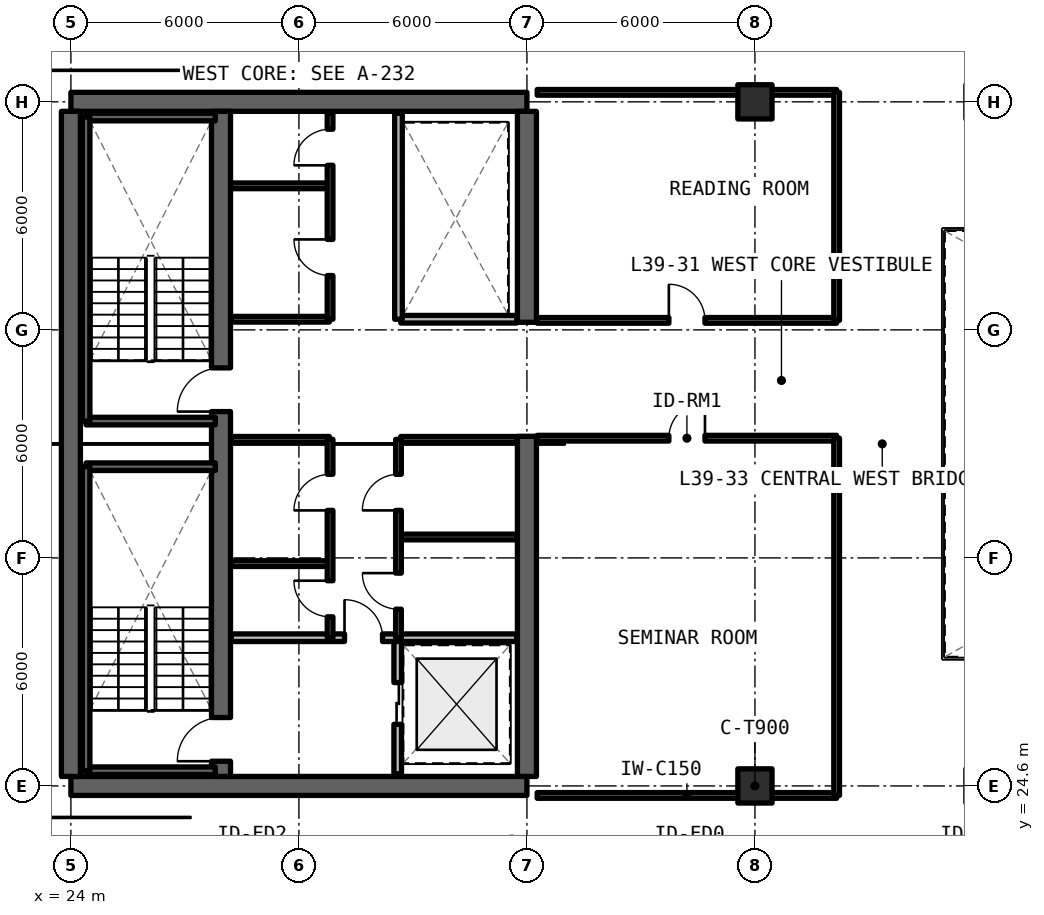
"""IFC4 building model, lengths in metres.
Left out: names, types, materials, properties, quantities, classifications, styles, units other than length and angle.
Written with IfcOpenShell. Run it as: python <this file> out.ifc"""

import sys

from ifc_helpers import new_model, si_unit, direction, frame, frame_2d, origin, origin_2d, place, context, subcontext, project, spatial, rectangle, extrude, element, fill, save


model = new_model("IFC4")
c1 = context("Model", 3, precision=1e-05, world=origin(), true_north=direction((0.0, 1.0)))
c2 = subcontext(c1, "Body", "Model", "MODEL_VIEW")
j1 = project(units=[si_unit("LENGTHUNIT", "METRE"), si_unit("PLANEANGLEUNIT", "RADIAN")], contexts=[c1])
p1 = place(None, origin())
s1 = spatial("IfcSite", under=j1, at=p1, CompositionType="ELEMENT")
p2 = place(p1, origin())
s2 = spatial("IfcBuilding", under=s1, at=p2, CompositionType="ELEMENT")
p3 = place(p2, frame((0.0, 0.0, 141.9)))
s3 = spatial("IfcBuildingStorey", under=s2, at=p3, CompositionType="ELEMENT", Elevation=141.9)
for number, where, z_axis, x_axis in (
    (1, (24.0, 24.6, 0.0), (0.0, 0.0, 1.0), (1.0, 0.0, 0.0)),
    (2, (36.0, 42.6, 0.0), (0.0, 0.0, 1.0), (-1.0, 0.0, 0.0)),
):
    element("IfcWall", number, at=place(p3, frame(where, z_axis=z_axis, x_axis=x_axis)), inside=s3, PredefinedType="SHEAR", context=c2, shape_type="SweptSolid", body=[
        extrude(rectangle(XDim=12.0, YDim=0.5, at=frame_2d((6.0, 0.0))), origin(), (0.0, 0.0, 1.0), 3.3),
    ])
p4 = place(p3, frame((24.0, 24.85, 0.0), z_axis=(0.0, 0.0, 1.0), x_axis=(0.0, 1.0, 0.0)))
e3 = element("IfcWall", 3, at=p4, inside=s3, PredefinedType="SHEAR", context=c2, shape_type="SweptSolid", body=[
    extrude(rectangle(XDim=17.5, YDim=0.5, at=frame_2d((8.75, 0.0))), origin(), (0.0, 0.0, 1.0), 3.3),
])
p5 = place(p3, frame((36.0, 24.85, 0.0), z_axis=(0.0, 0.0, 1.0), x_axis=(0.0, 1.0, 0.0)))
e4 = element("IfcWall", 4, at=p5, inside=s3, PredefinedType="SHEAR", context=c2, shape_type="SweptSolid", body=[
    extrude(rectangle(XDim=8.95, YDim=0.5, at=frame_2d((4.475, 0.0))), origin(), (0.0, 0.0, 1.0), 3.3),
])
p6 = place(p3, frame((36.0, 36.8, 0.0), z_axis=(0.0, 0.0, 1.0), x_axis=(0.0, 1.0, 0.0)))
e5 = element("IfcWall", 5, at=p6, inside=s3, PredefinedType="SHEAR", context=c2, shape_type="SweptSolid", body=[
    extrude(rectangle(XDim=5.55, YDim=0.5, at=frame_2d((2.775, 0.0))), origin(), (0.0, 0.0, 1.0), 3.3),
])
p7 = place(p3, frame((27.95, 24.85, 0.0), z_axis=(0.0, 0.0, 1.0), x_axis=(0.0, 1.0, 0.0)))
e6 = element("IfcWall", 6, at=p7, inside=s3, PredefinedType="SHEAR", context=c2, shape_type="SweptSolid", body=[
    extrude(rectangle(XDim=17.5, YDim=0.5, at=frame_2d((8.75, 0.0))), origin(), (0.0, 0.0, 1.0), 3.3),
])
p8 = place(p7, frame((0.4, 0.0, 0.0)))
e7 = element("IfcOpeningElement", 7, at=p8, cuts=e6, PredefinedType="OPENING", context=c2, shape_type="SweptSolid", body=[
    extrude(rectangle(XDim=1.15, YDim=2.15, at=frame_2d((0.575, 1.075))), frame((0.0, 0.26, 0.0), z_axis=(0.0, -1.0, 0.0), x_axis=(1.0, 0.0, 0.0)), (0.0, 0.0, 1.0), 0.52),
])
p9 = place(p7, frame((9.6, 0.0, 0.0)))
e8 = element("IfcOpeningElement", 8, at=p9, cuts=e6, PredefinedType="OPENING", context=c2, shape_type="SweptSolid", body=[
    extrude(rectangle(XDim=1.15, YDim=2.15, at=frame_2d((0.575, 1.075))), frame((0.0, 0.26, 0.0), z_axis=(0.0, -1.0, 0.0), x_axis=(1.0, 0.0, 0.0)), (0.0, 0.0, 1.0), 0.52),
])
for number, where, z_axis, x_axis in (
    (9, (42.0, 24.6, 0.0), (0.0, 0.0, 1.0), (1.0, 0.0, 0.0)),
    (10, (42.0, 42.6, 0.0), (0.0, 0.0, 1.0), (1.0, 0.0, 0.0)),
):
    element("IfcColumn", number, at=place(p3, frame(where, z_axis=z_axis, x_axis=x_axis)), inside=s3, PredefinedType="COLUMN", context=c2, shape_type="SweptSolid", body=[
        extrude(rectangle(XDim=0.9, YDim=0.9, at=origin_2d()), origin(), (0.0, 0.0, 1.0), 3.3),
    ])
p10 = place(p3, frame((32.6, 24.92, 0.0), z_axis=(0.0, 0.0, 1.0), x_axis=(0.0, 1.0, 0.0)))
e11 = element("IfcWall", 11, at=p10, inside=s3, PredefinedType="SOLIDWALL", context=c2, shape_type="SweptSolid", body=[
    extrude(rectangle(XDim=3.58, YDim=0.2, at=frame_2d((1.79, 0.0))), origin(), (0.0, 0.0, 1.0), 2.35),
])
p11 = place(p10, frame((1.3, 0.0, 0.0)))
e12 = element("IfcOpeningElement", 12, at=p11, cuts=e11, PredefinedType="OPENING", context=c2, shape_type="SweptSolid", body=[
    extrude(rectangle(XDim=1.1, YDim=2.2, at=frame_2d((0.55, 1.1))), frame((0.0, 0.11, 0.0), z_axis=(0.0, -1.0, 0.0), x_axis=(1.0, 0.0, 0.0)), (0.0, 0.0, 1.0), 0.22),
])
p12 = place(p3, frame((28.22, 28.5, 0.0), z_axis=(0.0, 0.0, 1.0), x_axis=(1.0, 0.0, 0.0)))
e13 = element("IfcWall", 13, at=p12, inside=s3, PredefinedType="SOLIDWALL", context=c2, shape_type="SweptSolid", body=[
    extrude(rectangle(XDim=7.51, YDim=0.2, at=frame_2d((3.755, 0.0))), origin(), (0.0, 0.0, 1.0), 2.35),
])
p13 = place(p12, frame((2.98, 0.0, 0.0)))
e14 = element("IfcOpeningElement", 14, at=p13, cuts=e13, PredefinedType="OPENING", context=c2, shape_type="SweptSolid", body=[
    extrude(rectangle(XDim=1.0, YDim=2.15, at=frame_2d((0.5, 1.075))), frame((0.0, 0.11, 0.0), z_axis=(0.0, -1.0, 0.0), x_axis=(1.0, 0.0, 0.0)), (0.0, 0.0, 1.0), 0.22),
])
for number, where, z_axis, x_axis in (
    (15, (28.22, 30.45, 0.0), (0.0, 0.0, 1.0), (1.0, 0.0, 0.0)),
    (16, (28.22, 33.72, 0.0), (0.0, 0.0, 1.0), (1.0, 0.0, 0.0)),
):
    element("IfcWall", number, at=place(p3, frame(where, z_axis=z_axis, x_axis=x_axis)), inside=s3, PredefinedType="SOLIDWALL", context=c2, shape_type="SweptSolid", body=[
        extrude(rectangle(XDim=2.58, YDim=0.15, at=frame_2d((1.29, 0.0))), origin(), (0.0, 0.0, 1.0), 2.35),
    ])
p14 = place(p3, frame((30.82, 28.5, 0.0), z_axis=(0.0, 0.0, 1.0), x_axis=(0.0, 1.0, 0.0)))
e17 = element("IfcWall", 17, at=p14, inside=s3, PredefinedType="SOLIDWALL", context=c2, shape_type="SweptSolid", body=[
    extrude(rectangle(XDim=5.22, YDim=0.15, at=frame_2d((2.61, 0.0))), origin(), (0.0, 0.0, 1.0), 2.35),
])
p15 = place(p14, frame((0.55, 0.0, 0.0)))
e18 = element("IfcOpeningElement", 18, at=p15, cuts=e17, PredefinedType="OPENING", context=c2, shape_type="SweptSolid", body=[
    extrude(rectangle(XDim=0.95, YDim=2.15, at=frame_2d((0.475, 1.075))), frame((0.0, 0.085, 0.0), z_axis=(0.0, -1.0, 0.0), x_axis=(1.0, 0.0, 0.0)), (0.0, 0.0, 1.0), 0.17),
])
p16 = place(p14, frame((3.35, 0.0, 0.0)))
e19 = element("IfcOpeningElement", 19, at=p16, cuts=e17, PredefinedType="OPENING", context=c2, shape_type="SweptSolid", body=[
    extrude(rectangle(XDim=0.95, YDim=2.15, at=frame_2d((0.475, 1.075))), frame((0.0, 0.085, 0.0), z_axis=(0.0, -1.0, 0.0), x_axis=(1.0, 0.0, 0.0)), (0.0, 0.0, 1.0), 0.17),
])
for number, where, z_axis, x_axis in (
    (20, (32.68, 31.15, 0.0), (0.0, 0.0, 1.0), (1.0, 0.0, 0.0)),
    (21, (32.68, 33.72, 0.0), (0.0, 0.0, 1.0), (1.0, 0.0, 0.0)),
):
    element("IfcWall", number, at=place(p3, frame(where, z_axis=z_axis, x_axis=x_axis)), inside=s3, PredefinedType="SOLIDWALL", context=c2, shape_type="SweptSolid", body=[
        extrude(rectangle(XDim=3.05, YDim=0.15, at=frame_2d((1.525, 0.0))), origin(), (0.0, 0.0, 1.0), 2.35),
    ])
p17 = place(p3, frame((32.62, 28.5, 0.0), z_axis=(0.0, 0.0, 1.0), x_axis=(0.0, 1.0, 0.0)))
e22 = element("IfcWall", 22, at=p17, inside=s3, PredefinedType="SOLIDWALL", context=c2, shape_type="SweptSolid", body=[
    extrude(rectangle(XDim=5.22, YDim=0.15, at=frame_2d((2.61, 0.0))), origin(), (0.0, 0.0, 1.0), 2.35),
])
p18 = place(p17, frame((0.75, 0.0, 0.0)))
e23 = element("IfcOpeningElement", 23, at=p18, cuts=e22, PredefinedType="OPENING", context=c2, shape_type="SweptSolid", body=[
    extrude(rectangle(XDim=0.95, YDim=2.15, at=frame_2d((0.475, 1.075))), frame((0.0, 0.085, 0.0), z_axis=(0.0, -1.0, 0.0), x_axis=(1.0, 0.0, 0.0)), (0.0, 0.0, 1.0), 0.17),
])
p19 = place(p17, frame((3.35, 0.0, 0.0)))
e24 = element("IfcOpeningElement", 24, at=p19, cuts=e22, PredefinedType="OPENING", context=c2, shape_type="SweptSolid", body=[
    extrude(rectangle(XDim=0.95, YDim=2.15, at=frame_2d((0.475, 1.075))), frame((0.0, 0.085, 0.0), z_axis=(0.0, -1.0, 0.0), x_axis=(1.0, 0.0, 0.0)), (0.0, 0.0, 1.0), 0.17),
])
for number, where, z_axis, x_axis in (
    (25, (28.22, 36.88, 0.0), (0.0, 0.0, 1.0), (1.0, 0.0, 0.0)),
    (26, (28.22, 40.39, 0.0), (0.0, 0.0, 1.0), (1.0, 0.0, 0.0)),
):
    element("IfcWall", number, at=place(p3, frame(where, z_axis=z_axis, x_axis=x_axis)), inside=s3, PredefinedType="SOLIDWALL", context=c2, shape_type="SweptSolid", body=[
        extrude(rectangle(XDim=2.58, YDim=0.15, at=frame_2d((1.29, 0.0))), origin(), (0.0, 0.0, 1.0), 2.35),
    ])
p20 = place(p3, frame((30.82, 36.88, 0.0), z_axis=(0.0, 0.0, 1.0), x_axis=(0.0, 1.0, 0.0)))
e27 = element("IfcWall", 27, at=p20, inside=s3, PredefinedType="SOLIDWALL", context=c2, shape_type="SweptSolid", body=[
    extrude(rectangle(XDim=5.42, YDim=0.15, at=frame_2d((2.71, 0.0))), origin(), (0.0, 0.0, 1.0), 2.35),
])
p21 = place(p20, frame((1.15, 0.0, 0.0)))
e28 = element("IfcOpeningElement", 28, at=p21, cuts=e27, PredefinedType="OPENING", context=c2, shape_type="SweptSolid", body=[
    extrude(rectangle(XDim=0.95, YDim=2.15, at=frame_2d((0.475, 1.075))), frame((0.0, 0.085, 0.0), z_axis=(0.0, -1.0, 0.0), x_axis=(1.0, 0.0, 0.0)), (0.0, 0.0, 1.0), 0.17),
])
p22 = place(p20, frame((4.05, 0.0, 0.0)))
e29 = element("IfcOpeningElement", 29, at=p22, cuts=e27, PredefinedType="OPENING", context=c2, shape_type="SweptSolid", body=[
    extrude(rectangle(XDim=0.95, YDim=2.15, at=frame_2d((0.475, 1.075))), frame((0.0, 0.085, 0.0), z_axis=(0.0, -1.0, 0.0), x_axis=(1.0, 0.0, 0.0)), (0.0, 0.0, 1.0), 0.17),
])
p23 = place(p3, frame((32.68, 36.88, 0.0), z_axis=(0.0, 0.0, 1.0), x_axis=(1.0, 0.0, 0.0)))
e30 = element("IfcWall", 30, at=p23, inside=s3, PredefinedType="SOLIDWALL", context=c2, shape_type="SweptSolid", body=[
    extrude(rectangle(XDim=3.05, YDim=0.2, at=frame_2d((1.525, 0.0))), origin(), (0.0, 0.0, 1.0), 2.35),
])
p24 = place(p3, frame((32.62, 36.88, 0.0), z_axis=(0.0, 0.0, 1.0), x_axis=(0.0, 1.0, 0.0)))
e31 = element("IfcWall", 31, at=p24, inside=s3, PredefinedType="SOLIDWALL", context=c2, shape_type="SweptSolid", body=[
    extrude(rectangle(XDim=5.42, YDim=0.2, at=frame_2d((2.71, 0.0))), origin(), (0.0, 0.0, 1.0), 2.35),
])
p25 = place(p3, frame((36.27, 24.35, 0.0), z_axis=(0.0, 0.0, 1.0), x_axis=(1.0, 0.0, 0.0)))
e32 = element("IfcWall", 32, at=p25, inside=s3, PredefinedType="SOLIDWALL", context=c2, shape_type="SweptSolid", body=[
    extrude(rectangle(XDim=7.88, YDim=0.15, at=frame_2d((3.94, 0.0))), origin(), (0.0, 0.0, 1.0), 2.35),
])
p26 = place(p3, frame((36.27, 33.75, 0.0), z_axis=(0.0, 0.0, 1.0), x_axis=(1.0, 0.0, 0.0)))
e33 = element("IfcWall", 33, at=p26, inside=s3, PredefinedType="SOLIDWALL", context=c2, shape_type="SweptSolid", body=[
    extrude(rectangle(XDim=7.88, YDim=0.15, at=frame_2d((3.94, 0.0))), origin(), (0.0, 0.0, 1.0), 2.35),
])
p27 = place(p26, frame((3.465, 0.0, 0.0)))
e34 = element("IfcOpeningElement", 34, at=p27, cuts=e33, PredefinedType="OPENING", context=c2, shape_type="SweptSolid", body=[
    extrude(rectangle(XDim=0.95, YDim=2.15, at=frame_2d((0.475, 1.075))), frame((0.0, 0.085, 0.0), z_axis=(0.0, -1.0, 0.0), x_axis=(1.0, 0.0, 0.0)), (0.0, 0.0, 1.0), 0.17),
])
p28 = place(p3, frame((44.15, 24.35, 0.0), z_axis=(0.0, 0.0, 1.0), x_axis=(0.0, 1.0, 0.0)))
e35 = element("IfcWall", 35, at=p28, inside=s3, PredefinedType="SOLIDWALL", context=c2, shape_type="SweptSolid", body=[
    extrude(rectangle(XDim=9.4, YDim=0.15, at=frame_2d((4.7, 0.0))), origin(), (0.0, 0.0, 1.0), 2.35),
])
p29 = place(p3, frame((36.27, 36.85, 0.0), z_axis=(0.0, 0.0, 1.0), x_axis=(1.0, 0.0, 0.0)))
e36 = element("IfcWall", 36, at=p29, inside=s3, PredefinedType="SOLIDWALL", context=c2, shape_type="SweptSolid", body=[
    extrude(rectangle(XDim=7.88, YDim=0.15, at=frame_2d((3.94, 0.0))), origin(), (0.0, 0.0, 1.0), 2.35),
])
p30 = place(p29, frame((3.465, 0.0, 0.0)))
e37 = element("IfcOpeningElement", 37, at=p30, cuts=e36, PredefinedType="OPENING", context=c2, shape_type="SweptSolid", body=[
    extrude(rectangle(XDim=0.95, YDim=2.15, at=frame_2d((0.475, 1.075))), frame((0.0, 0.085, 0.0), z_axis=(0.0, -1.0, 0.0), x_axis=(1.0, 0.0, 0.0)), (0.0, 0.0, 1.0), 0.17),
])
p31 = place(p3, frame((36.27, 42.85, 0.0), z_axis=(0.0, 0.0, 1.0), x_axis=(1.0, 0.0, 0.0)))
e38 = element("IfcWall", 38, at=p31, inside=s3, PredefinedType="SOLIDWALL", context=c2, shape_type="SweptSolid", body=[
    extrude(rectangle(XDim=7.88, YDim=0.15, at=frame_2d((3.94, 0.0))), origin(), (0.0, 0.0, 1.0), 2.35),
])
p32 = place(p3, frame((44.15, 36.85, 0.0), z_axis=(0.0, 0.0, 1.0), x_axis=(0.0, 1.0, 0.0)))
e39 = element("IfcWall", 39, at=p32, inside=s3, PredefinedType="SOLIDWALL", context=c2, shape_type="SweptSolid", body=[
    extrude(rectangle(XDim=6.0, YDim=0.15, at=frame_2d((3.0, 0.0))), origin(), (0.0, 0.0, 1.0), 2.35),
])
for number, where, z_axis, x_axis in (
    (40, (24.4, 25.0, 0.0), (0.0, 0.0, 1.0), (1.0, 0.0, 0.0)),
    (41, (27.8, 33.0, 0.0), (0.0, 0.0, 1.0), (-1.0, 0.0, 0.0)),
):
    element("IfcWall", number, at=place(p3, frame(where, z_axis=z_axis, x_axis=x_axis)), inside=s3, PredefinedType="SOLIDWALL", context=c2, shape_type="SweptSolid", body=[
        extrude(rectangle(XDim=3.4, YDim=0.2, at=frame_2d((1.7, 0.0))), origin(), (0.0, 0.0, 1.0), 3.3),
    ])
p33 = place(p3, frame((24.4, 33.0, 0.0), z_axis=(0.0, 0.0, 1.0), x_axis=(0.0, -1.0, 0.0)))
e42 = element("IfcWall", 42, at=p33, inside=s3, PredefinedType="SOLIDWALL", context=c2, shape_type="SweptSolid", body=[
    extrude(rectangle(XDim=8.0, YDim=0.2, at=frame_2d((4.0, 0.0))), origin(), (0.0, 0.0, 1.0), 3.3),
])
for number, where, z_axis, x_axis in (
    (43, (24.4, 34.2, 0.0), (0.0, 0.0, 1.0), (1.0, 0.0, 0.0)),
    (44, (27.8, 42.2, 0.0), (0.0, 0.0, 1.0), (-1.0, 0.0, 0.0)),
):
    element("IfcWall", number, at=place(p3, frame(where, z_axis=z_axis, x_axis=x_axis)), inside=s3, PredefinedType="SOLIDWALL", context=c2, shape_type="SweptSolid", body=[
        extrude(rectangle(XDim=3.4, YDim=0.2, at=frame_2d((1.7, 0.0))), origin(), (0.0, 0.0, 1.0), 3.3),
    ])
p34 = place(p3, frame((24.4, 42.2, 0.0), z_axis=(0.0, 0.0, 1.0), x_axis=(0.0, -1.0, 0.0)))
e45 = element("IfcWall", 45, at=p34, inside=s3, PredefinedType="SOLIDWALL", context=c2, shape_type="SweptSolid", body=[
    extrude(rectangle(XDim=8.0, YDim=0.2, at=frame_2d((4.0, 0.0))), origin(), (0.0, 0.0, 1.0), 3.3),
])
p35 = place(p11, origin())
e46 = element("IfcDoor", 46, at=p35, inside=s3, OperationType="SLIDING_TO_LEFT", PredefinedType="DOOR", context=c2, shape_type="SweptSolid", body=[
    extrude(rectangle(XDim=1.1, YDim=2.2, at=frame_2d((0.55, 1.1))), frame((0.0, 0.025, 0.0), z_axis=(0.0, -1.0, 0.0), x_axis=(1.0, 0.0, 0.0)), (0.0, 0.0, 1.0), 0.05),
])
fill(e12, e46)
p36 = place(p13, origin())
e47 = element("IfcDoor", 47, at=p36, inside=s3, OperationType="SINGLE_SWING_LEFT", PredefinedType="DOOR", context=c2, shape_type="SweptSolid", body=[
    extrude(rectangle(XDim=1.0, YDim=2.15, at=frame_2d((0.5, 1.075))), frame((0.0, 0.025, 0.0), z_axis=(0.0, -1.0, 0.0), x_axis=(1.0, 0.0, 0.0)), (0.0, 0.0, 1.0), 0.05),
])
fill(e14, e47)
p37 = place(p15, origin())
e48 = element("IfcDoor", 48, at=p37, inside=s3, OperationType="SINGLE_SWING_RIGHT", PredefinedType="DOOR", context=c2, shape_type="SweptSolid", body=[
    extrude(rectangle(XDim=0.95, YDim=2.15, at=frame_2d((0.475, 1.075))), frame((0.0, 0.025, 0.0), z_axis=(0.0, -1.0, 0.0), x_axis=(1.0, 0.0, 0.0)), (0.0, 0.0, 1.0), 0.05),
])
fill(e18, e48)
p38 = place(p16, origin())
e49 = element("IfcDoor", 49, at=p38, inside=s3, OperationType="SINGLE_SWING_LEFT", PredefinedType="DOOR", context=c2, shape_type="SweptSolid", body=[
    extrude(rectangle(XDim=0.95, YDim=2.15, at=frame_2d((0.475, 1.075))), frame((0.0, 0.025, 0.0), z_axis=(0.0, -1.0, 0.0), x_axis=(1.0, 0.0, 0.0)), (0.0, 0.0, 1.0), 0.05),
])
fill(e19, e49)
p39 = place(p18, origin())
e50 = element("IfcDoor", 50, at=p39, inside=s3, OperationType="SINGLE_SWING_RIGHT", PredefinedType="DOOR", context=c2, shape_type="SweptSolid", body=[
    extrude(rectangle(XDim=0.95, YDim=2.15, at=frame_2d((0.475, 1.075))), frame((0.0, 0.025, 0.0), z_axis=(0.0, -1.0, 0.0), x_axis=(1.0, 0.0, 0.0)), (0.0, 0.0, 1.0), 0.05),
])
fill(e23, e50)
p40 = place(p19, origin())
e51 = element("IfcDoor", 51, at=p40, inside=s3, OperationType="SINGLE_SWING_LEFT", PredefinedType="DOOR", context=c2, shape_type="SweptSolid", body=[
    extrude(rectangle(XDim=0.95, YDim=2.15, at=frame_2d((0.475, 1.075))), frame((0.0, 0.025, 0.0), z_axis=(0.0, -1.0, 0.0), x_axis=(1.0, 0.0, 0.0)), (0.0, 0.0, 1.0), 0.05),
])
fill(e24, e51)
p41 = place(p21, origin())
e52 = element("IfcDoor", 52, at=p41, inside=s3, OperationType="SINGLE_SWING_RIGHT", PredefinedType="DOOR", context=c2, shape_type="SweptSolid", body=[
    extrude(rectangle(XDim=0.95, YDim=2.15, at=frame_2d((0.475, 1.075))), frame((0.0, 0.025, 0.0), z_axis=(0.0, -1.0, 0.0), x_axis=(1.0, 0.0, 0.0)), (0.0, 0.0, 1.0), 0.05),
])
fill(e28, e52)
p42 = place(p22, origin())
e53 = element("IfcDoor", 53, at=p42, inside=s3, OperationType="SINGLE_SWING_LEFT", PredefinedType="DOOR", context=c2, shape_type="SweptSolid", body=[
    extrude(rectangle(XDim=0.95, YDim=2.15, at=frame_2d((0.475, 1.075))), frame((0.0, 0.025, 0.0), z_axis=(0.0, -1.0, 0.0), x_axis=(1.0, 0.0, 0.0)), (0.0, 0.0, 1.0), 0.05),
])
fill(e29, e53)
p43 = place(p27, origin())
e54 = element("IfcDoor", 54, at=p43, inside=s3, OperationType="SINGLE_SWING_RIGHT", PredefinedType="DOOR", context=c2, shape_type="SweptSolid", body=[
    extrude(rectangle(XDim=0.95, YDim=2.15, at=frame_2d((0.475, 1.075))), frame((0.0, 0.025, 0.0), z_axis=(0.0, -1.0, 0.0), x_axis=(1.0, 0.0, 0.0)), (0.0, 0.0, 1.0), 0.05),
])
fill(e34, e54)
p44 = place(p30, origin())
e55 = element("IfcDoor", 55, at=p44, inside=s3, OperationType="SINGLE_SWING_LEFT", PredefinedType="DOOR", context=c2, shape_type="SweptSolid", body=[
    extrude(rectangle(XDim=0.95, YDim=2.15, at=frame_2d((0.475, 1.075))), frame((0.0, 0.025, 0.0), z_axis=(0.0, -1.0, 0.0), x_axis=(1.0, 0.0, 0.0)), (0.0, 0.0, 1.0), 0.05),
])
fill(e37, e55)
p45 = place(p8, origin())
e56 = element("IfcDoor", 56, at=p45, inside=s3, OperationType="SINGLE_SWING_LEFT", PredefinedType="DOOR", context=c2, shape_type="SweptSolid", body=[
    extrude(rectangle(XDim=1.15, YDim=2.15, at=frame_2d((0.575, 1.075))), frame((0.0, 0.025, 0.0), z_axis=(0.0, -1.0, 0.0), x_axis=(1.0, 0.0, 0.0)), (0.0, 0.0, 1.0), 0.05),
])
fill(e7, e56)
p46 = place(p9, origin())
e57 = element("IfcDoor", 57, at=p46, inside=s3, OperationType="SINGLE_SWING_RIGHT", PredefinedType="DOOR", context=c2, shape_type="SweptSolid", body=[
    extrude(rectangle(XDim=1.15, YDim=2.15, at=frame_2d((0.575, 1.075))), frame((0.0, 0.025, 0.0), z_axis=(0.0, -1.0, 0.0), x_axis=(1.0, 0.0, 0.0)), (0.0, 0.0, 1.0), 0.05),
])
fill(e8, e57)
save(model, sys.argv[1])
